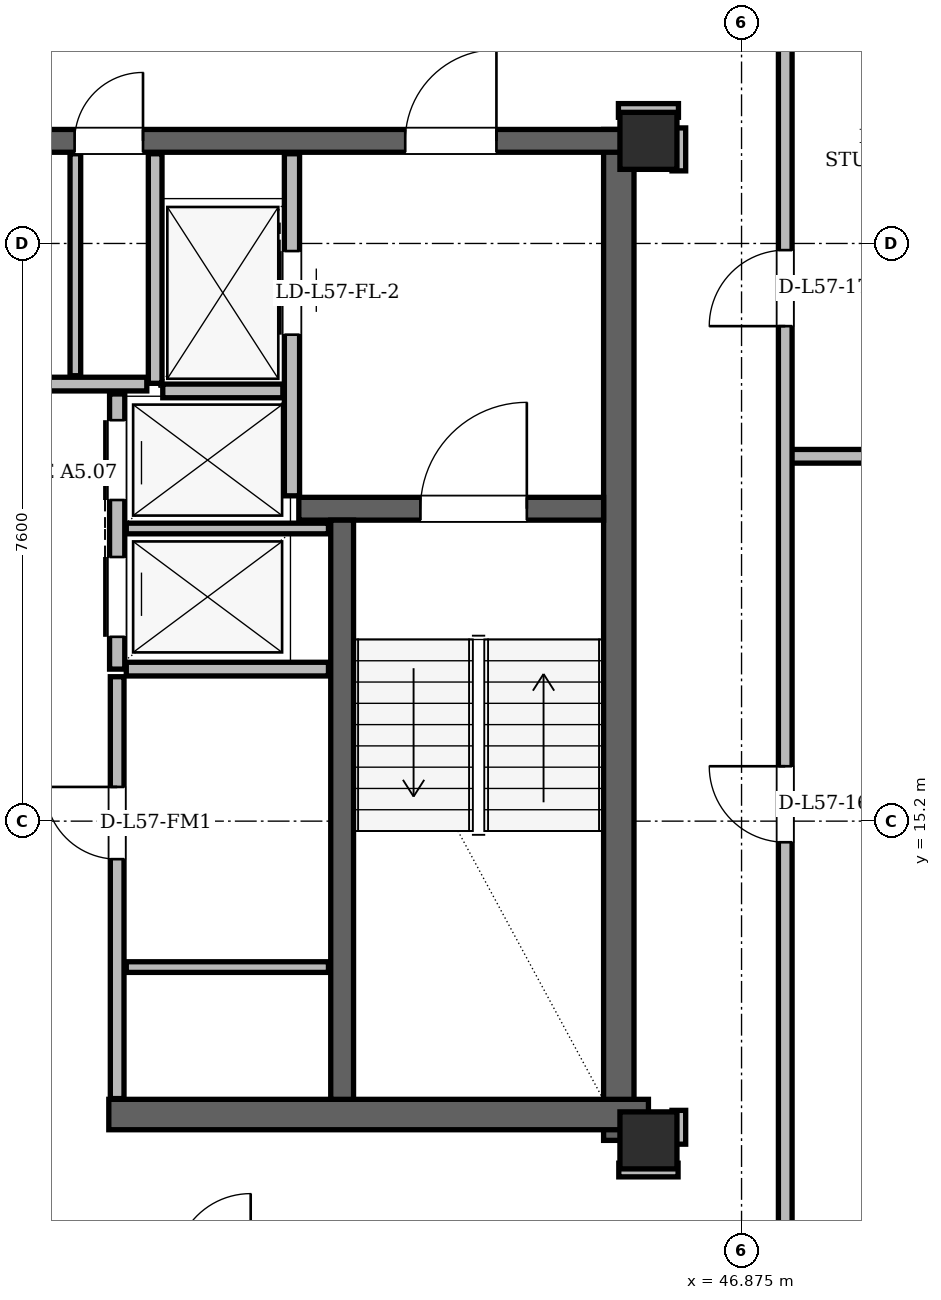
"""IFC4 building model, lengths in metres.
Left out: names, types, materials, properties, quantities, classifications, styles, units other than length and angle.
Written with IfcOpenShell. Run it as: python <this file> out.ifc"""

import sys

from ifc_helpers import new_model, si_unit, direction, frame, frame_2d, origin, origin_2d, place, context, subcontext, project, spatial, rectangle, hollow_rectangle, extrude, element, fill, save


model = new_model("IFC4")
c1 = context("Model", 3, precision=1e-05, world=origin(), true_north=direction((0.0, 1.0)))
c2 = subcontext(c1, "Body", "Model", "MODEL_VIEW")
j1 = project(units=[si_unit("LENGTHUNIT", "METRE"), si_unit("PLANEANGLEUNIT", "RADIAN")], contexts=[c1])
p1 = place(None, origin())
s1 = spatial("IfcSite", under=j1, at=p1, CompositionType="ELEMENT")
p2 = place(p1, origin())
s2 = spatial("IfcBuilding", under=s1, at=p2, CompositionType="ELEMENT")
p3 = place(p2, frame((0.0, 0.0, 216.3)))
s3 = spatial("IfcBuildingStorey", under=s2, at=p3, CompositionType="ELEMENT", Elevation=216.3)
for number, where, z_axis, x_axis in (
    (1, (45.65, 11.0, 0.0), (0.0, 0.0, 1.0), (1.0, 0.0, 0.0)),
    (2, (45.65, 24.15, 0.0), (0.0, 0.0, 1.0), (1.0, 0.0, 0.0)),
):
    element("IfcColumn", number, at=place(p3, frame(where, z_axis=z_axis, x_axis=x_axis)), inside=s3, PredefinedType="COLUMN", context=c2, shape_type="SweptSolid", body=[
        extrude(hollow_rectangle(XDim=0.75, YDim=0.75, WallThickness=0.06, at=origin_2d()), origin(), (0.0, 0.0, 1.0), 3.6),
    ])
p4 = place(p3, frame((45.26, 11.0, 0.0), z_axis=(0.0, 0.0, 1.0), x_axis=(0.0, 1.0, 0.0)))
e3 = element("IfcWall", 3, at=p4, inside=s3, PredefinedType="SHEAR", context=c2, shape_type="SweptSolid", body=[
    extrude(rectangle(XDim=13.3, YDim=0.4, at=frame_2d((6.65, 0.0))), origin(), (0.0, 0.0, 1.0), 3.38),
])
p5 = place(p3, frame((38.55, 11.34, 0.0), z_axis=(0.0, 0.0, 1.0), x_axis=(1.0, 0.0, 0.0)))
e4 = element("IfcWall", 4, at=p5, inside=s3, PredefinedType="SHEAR", context=c2, shape_type="SweptSolid", body=[
    extrude(rectangle(XDim=7.1, YDim=0.4, at=frame_2d((3.55, 0.0))), origin(), (0.0, 0.0, 1.0), 3.38),
])
p6 = place(p3, frame((29.65, 24.15, 0.0), z_axis=(0.0, 0.0, 1.0), x_axis=(1.0, 0.0, 0.0)))
e5 = element("IfcWall", 5, at=p6, inside=s3, PredefinedType="SHEAR", context=c2, shape_type="SweptSolid", body=[
    extrude(rectangle(XDim=15.7, YDim=0.3, at=frame_2d((7.85, 0.0))), origin(), (0.0, 0.0, 1.0), 3.38),
])
p7 = place(p6, frame((1.7, 0.0, 0.0)))
e6 = element("IfcOpeningElement", 6, at=p7, cuts=e5, PredefinedType="OPENING", context=c2, shape_type="SweptSolid", body=[
    extrude(rectangle(XDim=1.2, YDim=2.2, at=frame_2d((0.6, 1.1))), frame((0.0, 0.15, 0.0), z_axis=(0.0, -1.0, 0.0), x_axis=(1.0, 0.0, 0.0)), (0.0, 0.0, 1.0), 0.3),
])
p8 = place(p6, frame((12.8, 0.0, 0.0)))
e7 = element("IfcOpeningElement", 7, at=p8, cuts=e5, PredefinedType="OPENING", context=c2, shape_type="SweptSolid", body=[
    extrude(rectangle(XDim=1.2, YDim=2.2, at=frame_2d((0.6, 1.1))), frame((0.0, 0.15, 0.0), z_axis=(0.0, -1.0, 0.0), x_axis=(1.0, 0.0, 0.0)), (0.0, 0.0, 1.0), 0.3),
])
p9 = place(p6, frame((6.55, 0.0, 0.0)))
e8 = element("IfcOpeningElement", 8, at=p9, cuts=e5, PredefinedType="OPENING", context=c2, shape_type="SweptSolid", body=[
    extrude(rectangle(XDim=0.9, YDim=2.05, at=frame_2d((0.45, 1.025))), frame((0.0, 0.15, 0.0), z_axis=(0.0, -1.0, 0.0), x_axis=(1.0, 0.0, 0.0)), (0.0, 0.0, 1.0), 0.3),
])
p10 = place(p6, frame((8.45, 0.0, 0.0)))
e9 = element("IfcOpeningElement", 9, at=p10, cuts=e5, PredefinedType="OPENING", context=c2, shape_type="SweptSolid", body=[
    extrude(rectangle(XDim=0.9, YDim=2.05, at=frame_2d((0.45, 1.025))), frame((0.0, 0.15, 0.0), z_axis=(0.0, -1.0, 0.0), x_axis=(1.0, 0.0, 0.0)), (0.0, 0.0, 1.0), 0.3),
])
p11 = place(p3, frame((41.05, 19.31, 0.0), z_axis=(0.0, 0.0, 1.0), x_axis=(1.0, 0.0, 0.0)))
e10 = element("IfcWall", 10, at=p11, inside=s3, PredefinedType="SHEAR", context=c2, shape_type="SweptSolid", body=[
    extrude(rectangle(XDim=4.01, YDim=0.3, at=frame_2d((2.005, 0.0))), origin(), (0.0, 0.0, 1.0), 3.38),
])
p12 = place(p11, frame((1.6, 0.0, 0.0)))
e11 = element("IfcOpeningElement", 11, at=p12, cuts=e10, PredefinedType="OPENING", context=c2, shape_type="SweptSolid", body=[
    extrude(rectangle(XDim=1.4, YDim=2.2, at=frame_2d((0.7, 1.1))), frame((0.0, 0.15, 0.0), z_axis=(0.0, -1.0, 0.0), x_axis=(1.0, 0.0, 0.0)), (0.0, 0.0, 1.0), 0.3),
])
p13 = place(p3, frame((41.62, 11.54, 0.0), z_axis=(0.0, 0.0, 1.0), x_axis=(0.0, 1.0, 0.0)))
e12 = element("IfcWall", 12, at=p13, inside=s3, PredefinedType="SHEAR", context=c2, shape_type="SweptSolid", body=[
    extrude(rectangle(XDim=7.62, YDim=0.3, at=frame_2d((3.81, 0.0))), origin(), (0.0, 0.0, 1.0), 3.38),
])
p14 = place(p3, frame((59.157, 11.485, 0.0), z_axis=(0.0, 0.0, 1.0), x_axis=(-0.500000353019, 0.866025199969, 0.0)))
e13 = element("IfcWall", 13, at=p14, inside=s3, PredefinedType="SOLIDWALL", context=c2, shape_type="SweptSolid", body=[
    extrude(rectangle(XDim=36.579, YDim=0.29, at=frame_2d((18.289, 0.0))), origin(), (0.0, 0.0, 1.0), 2.677),
])
p15 = place(p14, frame((3.429, 0.0, 0.0)))
e14 = element("IfcOpeningElement", 14, at=p15, cuts=e13, PredefinedType="OPENING", context=c2, shape_type="SweptSolid", body=[
    extrude(rectangle(XDim=1.5, YDim=2.2, at=frame_2d((0.75, 1.1))), frame((0.0, 0.145, 0.0), z_axis=(0.0, -1.0, 0.0), x_axis=(1.0, 0.0, 0.0)), (0.0, 0.0, 1.0), 0.29),
])
p16 = place(p14, frame((27.044, 0.0, 0.0)))
e15 = element("IfcOpeningElement", 15, at=p16, cuts=e13, PredefinedType="OPENING", context=c2, shape_type="SweptSolid", body=[
    extrude(rectangle(XDim=1.5, YDim=2.2, at=frame_2d((0.75, 1.1))), frame((0.0, 0.145, 0.0), z_axis=(0.0, -1.0, 0.0), x_axis=(1.0, 0.0, 0.0)), (0.0, 0.0, 1.0), 0.29),
])
p17 = place(p14, frame((7.913, 0.0, 0.85)))
e16 = element("IfcOpeningElement", 16, at=p17, cuts=e13, PredefinedType="OPENING", context=c2, shape_type="SweptSolid", body=[
    extrude(rectangle(XDim=1.2, YDim=1.48, at=frame_2d((0.6, 0.74))), frame((0.0, 0.145, 0.0), z_axis=(0.0, -1.0, 0.0), x_axis=(1.0, 0.0, 0.0)), (0.0, 0.0, 1.0), 0.29),
])
p18 = place(p14, frame((1.258, 0.0, 0.85)))
e17 = element("IfcOpeningElement", 17, at=p18, cuts=e13, PredefinedType="OPENING", context=c2, shape_type="SweptSolid", body=[
    extrude(rectangle(XDim=1.2, YDim=1.48, at=frame_2d((0.6, 0.74))), frame((0.0, 0.145, 0.0), z_axis=(0.0, -1.0, 0.0), x_axis=(1.0, 0.0, 0.0)), (0.0, 0.0, 1.0), 0.29),
])
p19 = place(p14, frame((12.2, 0.0, 0.85)))
e18 = element("IfcOpeningElement", 18, at=p19, cuts=e13, PredefinedType="OPENING", context=c2, shape_type="SweptSolid", body=[
    extrude(rectangle(XDim=2.0, YDim=1.717, at=frame_2d((1.0, 0.858))), frame((0.0, 0.145, 0.0), z_axis=(0.0, -1.0, 0.0), x_axis=(1.0, 0.0, 0.0)), (0.0, 0.0, 1.0), 0.29),
])
p20 = place(p14, frame((17.302, 0.0, 0.85)))
e19 = element("IfcOpeningElement", 19, at=p20, cuts=e13, PredefinedType="OPENING", context=c2, shape_type="SweptSolid", body=[
    extrude(rectangle(XDim=1.4, YDim=1.6, at=frame_2d((0.7, 0.8))), frame((0.0, 0.145, 0.0), z_axis=(0.0, -1.0, 0.0), x_axis=(1.0, 0.0, 0.0)), (0.0, 0.0, 1.0), 0.29),
])
p21 = place(p14, frame((20.753, 0.0, 0.85)))
e20 = element("IfcOpeningElement", 20, at=p21, cuts=e13, PredefinedType="OPENING", context=c2, shape_type="SweptSolid", body=[
    extrude(rectangle(XDim=1.2, YDim=1.48, at=frame_2d((0.6, 0.74))), frame((0.0, 0.145, 0.0), z_axis=(0.0, -1.0, 0.0), x_axis=(1.0, 0.0, 0.0)), (0.0, 0.0, 1.0), 0.29),
])
p22 = place(p14, frame((34.201, 0.0, 0.85)))
e21 = element("IfcOpeningElement", 21, at=p22, cuts=e13, PredefinedType="OPENING", context=c2, shape_type="SweptSolid", body=[
    extrude(rectangle(XDim=1.2, YDim=1.48, at=frame_2d((0.6, 0.74))), frame((0.0, 0.145, 0.0), z_axis=(0.0, -1.0, 0.0), x_axis=(1.0, 0.0, 0.0)), (0.0, 0.0, 1.0), 0.29),
])
p23 = place(p3, frame((40.96, 19.48, 0.0), z_axis=(0.0, 0.0, 1.0), x_axis=(0.0, 1.0, 0.0)))
e22 = element("IfcWall", 22, at=p23, inside=s3, PredefinedType="PARTITIONING", context=c2, shape_type="SweptSolid", body=[
    extrude(rectangle(XDim=4.5, YDim=0.2, at=frame_2d((2.25, 0.0))), origin(), (0.0, 0.0, 1.0), 3.38),
])
p24 = place(p23, frame((2.12, 0.0, 0.0)))
e23 = element("IfcOpeningElement", 23, at=p24, cuts=e22, PredefinedType="OPENING", context=c2, shape_type="SweptSolid", body=[
    extrude(rectangle(XDim=1.1, YDim=2.2, at=frame_2d((0.55, 1.1))), frame((0.0, 0.1, 0.0), z_axis=(0.0, -1.0, 0.0), x_axis=(1.0, 0.0, 0.0)), (0.0, 0.0, 1.0), 0.2),
])
p25 = place(p3, frame((39.16, 20.96, 0.0), z_axis=(0.0, 0.0, 1.0), x_axis=(0.0, 1.0, 0.0)))
e24 = element("IfcWall", 24, at=p25, inside=s3, PredefinedType="PARTITIONING", context=c2, shape_type="SweptSolid", body=[
    extrude(rectangle(XDim=3.02, YDim=0.18, at=frame_2d((1.51, 0.0))), origin(), (0.0, 0.0, 1.0), 3.38),
])
p26 = place(p3, frame((39.26, 20.86, 0.0), z_axis=(0.0, 0.0, 1.0), x_axis=(1.0, 0.0, 0.0)))
e25 = element("IfcWall", 25, at=p26, inside=s3, PredefinedType="PARTITIONING", context=c2, shape_type="SweptSolid", body=[
    extrude(rectangle(XDim=1.58, YDim=0.18, at=frame_2d((0.79, 0.0))), origin(), (0.0, 0.0, 1.0), 3.38),
])
p27 = place(p3, frame((38.66, 17.2, 0.0), z_axis=(0.0, 0.0, 1.0), x_axis=(0.0, 1.0, 0.0)))
e26 = element("IfcWall", 26, at=p27, inside=s3, PredefinedType="PARTITIONING", context=c2, shape_type="SweptSolid", body=[
    extrude(rectangle(XDim=3.62, YDim=0.2, at=frame_2d((1.81, 0.0))), origin(), (0.0, 0.0, 1.0), 3.38),
])
p28 = place(p27, frame((0.425, 0.0, 0.0)))
e27 = element("IfcOpeningElement", 27, at=p28, cuts=e26, PredefinedType="OPENING", context=c2, shape_type="SweptSolid", body=[
    extrude(rectangle(XDim=1.05, YDim=2.15, at=frame_2d((0.525, 1.075))), frame((0.0, 0.1, 0.0), z_axis=(0.0, -1.0, 0.0), x_axis=(1.0, 0.0, 0.0)), (0.0, 0.0, 1.0), 0.2),
])
p29 = place(p27, frame((2.225, 0.0, 0.0)))
e28 = element("IfcOpeningElement", 28, at=p29, cuts=e26, PredefinedType="OPENING", context=c2, shape_type="SweptSolid", body=[
    extrude(rectangle(XDim=1.05, YDim=2.15, at=frame_2d((0.525, 1.075))), frame((0.0, 0.1, 0.0), z_axis=(0.0, -1.0, 0.0), x_axis=(1.0, 0.0, 0.0)), (0.0, 0.0, 1.0), 0.2),
])
p30 = place(p3, frame((38.78, 17.2, 0.0), z_axis=(0.0, 0.0, 1.0), x_axis=(1.0, 0.0, 0.0)))
e29 = element("IfcWall", 29, at=p30, inside=s3, PredefinedType="PARTITIONING", context=c2, shape_type="SweptSolid", body=[
    extrude(rectangle(XDim=2.66, YDim=0.18, at=frame_2d((1.33, 0.0))), origin(), (0.0, 0.0, 1.0), 3.38),
])
p31 = place(p3, frame((38.78, 19.05, 0.0), z_axis=(0.0, 0.0, 1.0), x_axis=(1.0, 0.0, 0.0)))
e30 = element("IfcWall", 30, at=p31, inside=s3, PredefinedType="PARTITIONING", context=c2, shape_type="SweptSolid", body=[
    extrude(rectangle(XDim=2.66, YDim=0.14, at=frame_2d((1.33, 0.0))), origin(), (0.0, 0.0, 1.0), 3.38),
])
p32 = place(p3, frame((38.66, 11.55, 0.0), z_axis=(0.0, 0.0, 1.0), x_axis=(0.0, 1.0, 0.0)))
e31 = element("IfcWall", 31, at=p32, inside=s3, PredefinedType="PARTITIONING", context=c2, shape_type="SweptSolid", body=[
    extrude(rectangle(XDim=5.55, YDim=0.18, at=frame_2d((2.775, 0.0))), origin(), (0.0, 0.0, 1.0), 3.38),
])
p33 = place(p32, frame((3.15, 0.0, 0.0)))
e32 = element("IfcOpeningElement", 32, at=p33, cuts=e31, PredefinedType="OPENING", context=c2, shape_type="SweptSolid", body=[
    extrude(rectangle(XDim=0.95, YDim=2.1, at=frame_2d((0.475, 1.05))), frame((0.0, 0.09, 0.0), z_axis=(0.0, -1.0, 0.0), x_axis=(1.0, 0.0, 0.0)), (0.0, 0.0, 1.0), 0.18),
])
p34 = place(p3, frame((38.78, 13.28, 0.0), z_axis=(0.0, 0.0, 1.0), x_axis=(1.0, 0.0, 0.0)))
e33 = element("IfcWall", 33, at=p34, inside=s3, PredefinedType="PARTITIONING", context=c2, shape_type="SweptSolid", body=[
    extrude(rectangle(XDim=2.66, YDim=0.14, at=frame_2d((1.33, 0.0))), origin(), (0.0, 0.0, 1.0), 3.38),
])
p35 = place(p3, frame((35.95, 20.95, 0.0), z_axis=(0.0, 0.0, 1.0), x_axis=(1.0, 0.0, 0.0)))
e34 = element("IfcWall", 34, at=p35, inside=s3, PredefinedType="PARTITIONING", context=c2, shape_type="SweptSolid", body=[
    extrude(rectangle(XDim=3.1, YDim=0.18, at=frame_2d((1.55, 0.0))), origin(), (0.0, 0.0, 1.0), 3.38),
])
p36 = place(p3, frame((38.11, 21.06, 0.0), z_axis=(0.0, 0.0, 1.0), x_axis=(0.0, 1.0, 0.0)))
e35 = element("IfcWall", 35, at=p36, inside=s3, PredefinedType="PARTITIONING", context=c2, shape_type="SweptSolid", body=[
    extrude(rectangle(XDim=2.92, YDim=0.14, at=frame_2d((1.46, 0.0))), origin(), (0.0, 0.0, 1.0), 3.38),
])
p37 = place(p3, frame((45.26, 10.61, 0.0), z_axis=(0.0, 0.0, 1.0), x_axis=(1.0, 0.0, 0.0)))
e36 = element("IfcWall", 36, at=p37, inside=s3, PredefinedType="PARTITIONING", context=c2, shape_type="SweptSolid", body=[
    extrude(rectangle(XDim=0.78, YDim=0.18, at=frame_2d((0.39, 0.0))), origin(), (0.0, 0.0, 1.0), 3.38),
])
p38 = place(p3, frame((47.45, 20.0, 0.0), z_axis=(0.0, 0.0, 1.0), x_axis=(1.0, 0.0, 0.0)))
e37 = element("IfcWall", 37, at=p38, inside=s3, PredefinedType="PARTITIONING", context=c2, shape_type="SweptSolid", body=[
    extrude(rectangle(XDim=6.619, YDim=0.18, at=frame_2d((3.31, 0.0))), origin(), (0.0, 0.0, 1.0), 3.38),
])
p39 = place(p3, frame((45.255, 24.55, 0.0), z_axis=(0.0, 0.0, 1.0), x_axis=(1.0, 0.0, 0.0)))
e38 = element("IfcWall", 38, at=p39, inside=s3, PredefinedType="PARTITIONING", context=c2, shape_type="SweptSolid", body=[
    extrude(rectangle(XDim=0.79, YDim=0.18, at=frame_2d((0.395, 0.0))), origin(), (0.0, 0.0, 1.0), 2.913),
])
p40 = place(p3, frame((46.05, 10.95, 0.0), z_axis=(0.0, 0.0, 1.0), x_axis=(0.0, 1.0, 0.0)))
e39 = element("IfcWall", 39, at=p40, inside=s3, PredefinedType="PARTITIONING", context=c2, shape_type="SweptSolid", body=[
    extrude(rectangle(XDim=0.445, YDim=0.18, at=frame_2d((0.223, 0.0))), origin(), (0.0, 0.0, 1.0), 2.913),
])
p41 = place(p3, frame((46.05, 23.755, 0.0), z_axis=(0.0, 0.0, 1.0), x_axis=(0.0, 1.0, 0.0)))
e40 = element("IfcWall", 40, at=p41, inside=s3, PredefinedType="PARTITIONING", context=c2, shape_type="SweptSolid", body=[
    extrude(rectangle(XDim=0.565, YDim=0.18, at=frame_2d((0.283, 0.0))), origin(), (0.0, 0.0, 1.0), 3.38),
])
p42 = place(p3, frame((47.45, 5.801, 0.0), z_axis=(0.0, 0.0, 1.0), x_axis=(0.0, 1.0, 0.0)))
e41 = element("IfcWall", 41, at=p42, inside=s3, PredefinedType="PARTITIONING", context=c2, shape_type="SweptSolid", body=[
    extrude(rectangle(XDim=25.664, YDim=0.18, at=frame_2d((12.832, 0.0))), origin(), (0.0, 0.0, 1.0), 2.913),
])
p43 = place(p42, frame((9.122, 0.0, 0.0)))
e42 = element("IfcOpeningElement", 42, at=p43, cuts=e41, PredefinedType="OPENING", context=c2, shape_type="SweptSolid", body=[
    extrude(rectangle(XDim=1.0, YDim=2.18, at=frame_2d((0.5, 1.09))), frame((0.0, 0.09, 0.0), z_axis=(0.0, -1.0, 0.0), x_axis=(1.0, 0.0, 0.0)), (0.0, 0.0, 1.0), 0.18),
])
p44 = place(p42, frame((15.912, 0.0, 0.0)))
e43 = element("IfcOpeningElement", 43, at=p44, cuts=e41, PredefinedType="OPENING", context=c2, shape_type="SweptSolid", body=[
    extrude(rectangle(XDim=1.0, YDim=2.18, at=frame_2d((0.5, 1.09))), frame((0.0, 0.09, 0.0), z_axis=(0.0, -1.0, 0.0), x_axis=(1.0, 0.0, 0.0)), (0.0, 0.0, 1.0), 0.18),
])
p45 = place(p33, origin())
e44 = element("IfcDoor", 44, at=p45, inside=s3, OperationType="SINGLE_SWING_RIGHT", PredefinedType="DOOR", context=c2, shape_type="SweptSolid", body=[
    extrude(rectangle(XDim=0.95, YDim=2.1, at=frame_2d((0.475, 1.05))), frame((0.0, 0.025, 0.0), z_axis=(0.0, -1.0, 0.0), x_axis=(1.0, 0.0, 0.0)), (0.0, 0.0, 1.0), 0.05),
])
fill(e32, e44)
p46 = place(p24, origin())
e45 = element("IfcDoor", 45, at=p46, inside=s3, OperationType="SLIDING_TO_RIGHT", PredefinedType="DOOR", context=c2, shape_type="SweptSolid", body=[
    extrude(rectangle(XDim=1.1, YDim=2.2, at=frame_2d((0.55, 1.1))), frame((0.0, 0.025, 0.0), z_axis=(0.0, -1.0, 0.0), x_axis=(1.0, 0.0, 0.0)), (0.0, 0.0, 1.0), 0.05),
])
fill(e23, e45)
p47 = place(p28, origin())
e46 = element("IfcDoor", 46, at=p47, inside=s3, OperationType="SLIDING_TO_RIGHT", PredefinedType="DOOR", context=c2, shape_type="SweptSolid", body=[
    extrude(rectangle(XDim=1.05, YDim=2.15, at=frame_2d((0.525, 1.075))), frame((0.0, 0.025, 0.0), z_axis=(0.0, -1.0, 0.0), x_axis=(1.0, 0.0, 0.0)), (0.0, 0.0, 1.0), 0.05),
])
fill(e27, e46)
p48 = place(p29, origin())
e47 = element("IfcDoor", 47, at=p48, inside=s3, OperationType="SLIDING_TO_LEFT", PredefinedType="DOOR", context=c2, shape_type="SweptSolid", body=[
    extrude(rectangle(XDim=1.05, YDim=2.15, at=frame_2d((0.525, 1.075))), frame((0.0, 0.025, 0.0), z_axis=(0.0, -1.0, 0.0), x_axis=(1.0, 0.0, 0.0)), (0.0, 0.0, 1.0), 0.05),
])
fill(e28, e47)
p49 = place(p12, origin())
e48 = element("IfcDoor", 48, at=p49, inside=s3, OperationType="SINGLE_SWING_RIGHT", PredefinedType="DOOR", context=c2, shape_type="SweptSolid", body=[
    extrude(rectangle(XDim=1.4, YDim=2.2, at=frame_2d((0.7, 1.1))), frame((0.0, 0.025, 0.0), z_axis=(0.0, -1.0, 0.0), x_axis=(1.0, 0.0, 0.0)), (0.0, 0.0, 1.0), 0.05),
])
fill(e11, e48)
p50 = place(p8, origin())
e49 = element("IfcDoor", 49, at=p50, inside=s3, OperationType="SINGLE_SWING_RIGHT", PredefinedType="DOOR", context=c2, shape_type="SweptSolid", body=[
    extrude(rectangle(XDim=1.2, YDim=2.2, at=frame_2d((0.6, 1.1))), frame((0.0, 0.025, 0.0), z_axis=(0.0, -1.0, 0.0), x_axis=(1.0, 0.0, 0.0)), (0.0, 0.0, 1.0), 0.05),
])
fill(e7, e49)
p51 = place(p10, origin())
e50 = element("IfcDoor", 50, at=p51, inside=s3, OperationType="SINGLE_SWING_RIGHT", PredefinedType="DOOR", context=c2, shape_type="SweptSolid", body=[
    extrude(rectangle(XDim=0.9, YDim=2.05, at=frame_2d((0.45, 1.025))), frame((0.0, 0.025, 0.0), z_axis=(0.0, -1.0, 0.0), x_axis=(1.0, 0.0, 0.0)), (0.0, 0.0, 1.0), 0.05),
])
fill(e9, e50)
p52 = place(p43, origin())
e51 = element("IfcDoor", 51, at=p52, inside=s3, OperationType="SINGLE_SWING_RIGHT", PredefinedType="DOOR", context=c2, shape_type="SweptSolid", body=[
    extrude(rectangle(XDim=1.0, YDim=2.18, at=frame_2d((0.5, 1.09))), frame((0.0, 0.025, 0.0), z_axis=(0.0, -1.0, 0.0), x_axis=(1.0, 0.0, 0.0)), (0.0, 0.0, 1.0), 0.05),
])
fill(e42, e51)
p53 = place(p44, origin())
e52 = element("IfcDoor", 52, at=p53, inside=s3, OperationType="SINGLE_SWING_LEFT", PredefinedType="DOOR", context=c2, shape_type="SweptSolid", body=[
    extrude(rectangle(XDim=1.0, YDim=2.18, at=frame_2d((0.5, 1.09))), frame((0.0, 0.025, 0.0), z_axis=(0.0, -1.0, 0.0), x_axis=(1.0, 0.0, 0.0)), (0.0, 0.0, 1.0), 0.05),
])
fill(e43, e52)
save(model, sys.argv[1])
